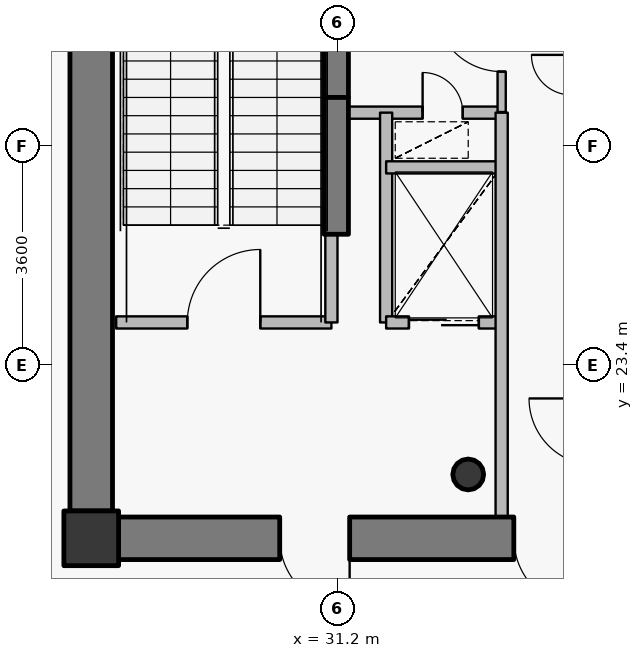
"""IFC4 building model, lengths in metres.
Left out: names, types, materials, properties, quantities, classifications, styles, units other than length and angle.
Written with IfcOpenShell. Run it as: python <this file> out.ifc"""

import sys

from ifc_helpers import new_model, si_unit, direction, frame, frame_2d, origin, origin_2d, place, context, subcontext, project, spatial, rectangle, hollow_circle, extrude, source, transform, mapped, element, fill, save


model = new_model("IFC4")
c1 = context("Model", 3, precision=1e-05, world=origin(), true_north=direction((0.0, 1.0)))
c2 = subcontext(c1, "Body", "Model", "MODEL_VIEW")
j1 = project(units=[si_unit("LENGTHUNIT", "METRE"), si_unit("PLANEANGLEUNIT", "RADIAN")], contexts=[c1])
p1 = place(None, origin())
s1 = spatial("IfcSite", under=j1, at=p1, CompositionType="ELEMENT")
p2 = place(p1, origin())
s2 = spatial("IfcBuilding", under=s1, at=p2, CompositionType="ELEMENT")
p3 = place(p2, frame((0.0, 0.0, 339.2)))
s3 = spatial("IfcBuildingStorey", under=s2, at=p3, CompositionType="ELEMENT", Elevation=339.2)
p4 = place(p3, frame((27.15, 20.55, 0.0), z_axis=(0.0, 0.0, 1.0), x_axis=(1.0, 0.0, 0.0)))
e1 = element("IfcColumn", 1, at=p4, inside=s3, PredefinedType="COLUMN", context=c2, shape_type="SweptSolid", body=[
    extrude(rectangle(XDim=0.9, YDim=0.9, at=origin_2d()), origin(), (0.0, 0.0, 1.0), 3.8),
])
p5 = place(p3, frame((33.35, 21.6, 0.0), z_axis=(0.0, 0.0, 1.0), x_axis=(1.0, 0.0, 0.0)))
e2 = element("IfcColumn", 2, at=p5, inside=s3, PredefinedType="COLUMN", context=c2, shape_type="SweptSolid", body=[
    extrude(hollow_circle(Radius=0.254, WallThickness=0.02, at=origin_2d()), origin(), (0.0, 0.0, 1.0), 3.8),
])
p6 = place(p3, frame((31.18, 27.8, 0.0), z_axis=(0.0, 0.0, 1.0), x_axis=(0.0, 1.0, 0.0)))
e3 = element("IfcWall", 3, at=p6, inside=s3, PredefinedType="SHEAR", context=c2, shape_type="SweptSolid", body=[
    extrude(rectangle(XDim=4.75, YDim=0.4, at=frame_2d((2.375, 0.0))), origin(), (0.0, 0.0, 1.0), 3.8),
])
p7 = place(p3, frame((44.4, 20.55, 0.0), z_axis=(0.0, 0.0, 1.0), x_axis=(-1.0, 0.0, 0.0)))
e4 = element("IfcWall", 4, at=p7, inside=s3, PredefinedType="SHEAR", context=c2, shape_type="SweptSolid", body=[
    extrude(rectangle(XDim=16.8, YDim=0.7, at=frame_2d((8.4, 0.0))), origin(), (0.0, 0.0, 1.0), 3.1),
])
p8 = place(p7, frame((13.0, 0.0, 0.0)))
e5 = element("IfcOpeningElement", 5, at=p8, cuts=e4, PredefinedType="OPENING", context=c2, shape_type="SweptSolid", body=[
    extrude(rectangle(XDim=1.15, YDim=2.15, at=origin_2d()), frame((0.575, 0.36, 1.075), z_axis=(0.0, -1.0, 0.0), x_axis=(1.0, 0.0, 0.0)), (0.0, 0.0, 1.0), 0.72),
])
p9 = place(p7, frame((9.15, 0.0, 0.0)))
e6 = element("IfcOpeningElement", 6, at=p9, cuts=e4, PredefinedType="OPENING", context=c2, shape_type="SweptSolid", body=[
    extrude(rectangle(XDim=1.15, YDim=2.15, at=origin_2d()), frame((0.575, 0.36, 1.075), z_axis=(0.0, -1.0, 0.0), x_axis=(1.0, 0.0, 0.0)), (0.0, 0.0, 1.0), 0.72),
])
p10 = place(p3, frame((27.15, 21.0, 0.0), z_axis=(0.0, 0.0, 1.0), x_axis=(0.0, 1.0, 0.0)))
e7 = element("IfcWall", 7, at=p10, inside=s3, PredefinedType="SHEAR", context=c2, shape_type="SweptSolid", body=[
    extrude(rectangle(XDim=12.0, YDim=0.7, at=frame_2d((6.0, 0.0))), origin(), (0.0, 0.0, 1.0), 3.1),
])
p11 = place(p3, frame((31.18, 25.55, 0.0), z_axis=(0.0, 0.0, 1.0), x_axis=(0.0, 1.0, 0.0)))
e8 = element("IfcWall", 8, at=p11, inside=s3, PredefinedType="SHEAR", context=c2, shape_type="SweptSolid", body=[
    extrude(rectangle(XDim=2.25, YDim=0.4, at=frame_2d((1.125, 0.0))), origin(), (0.0, 0.0, 1.0), 3.15),
])
p12 = place(p3, frame((27.56, 24.1, 0.0), z_axis=(0.0, 0.0, 1.0), x_axis=(1.0, 0.0, 0.0)))
e9 = element("IfcWall", 9, at=p12, inside=s3, PredefinedType="PARTITIONING", context=c2, shape_type="SweptSolid", body=[
    extrude(rectangle(XDim=3.54, YDim=0.2, at=frame_2d((1.77, 0.0))), origin(), (0.0, 0.0, 1.0), 3.55),
])
p13 = place(p12, frame((1.17, 0.0, 0.0)))
e10 = element("IfcOpeningElement", 10, at=p13, cuts=e9, PredefinedType="OPENING", context=c2, shape_type="SweptSolid", body=[
    extrude(rectangle(XDim=1.2, YDim=2.15, at=origin_2d()), frame((0.6, 0.11, 1.075), z_axis=(0.0, -1.0, 0.0), x_axis=(1.0, 0.0, 0.0)), (0.0, 0.0, 1.0), 0.22),
])
p14 = place(p3, frame((31.1, 24.1, 0.0), z_axis=(0.0, 0.0, 1.0), x_axis=(0.0, 1.0, 0.0)))
e11 = element("IfcWall", 11, at=p14, inside=s3, PredefinedType="PARTITIONING", context=c2, shape_type="SweptSolid", body=[
    extrude(rectangle(XDim=1.44, YDim=0.2, at=frame_2d((0.72, 0.0))), origin(), (0.0, 0.0, 1.0), 3.55),
])
p15 = place(p3, frame((31.1, 27.55, 0.0), z_axis=(0.0, 0.0, 1.0), x_axis=(1.0, 0.0, 0.0)))
e12 = element("IfcWall", 12, at=p15, inside=s3, PredefinedType="PARTITIONING", context=c2, shape_type="SweptSolid", body=[
    extrude(rectangle(XDim=2.8, YDim=0.2, at=frame_2d((1.4, 0.0))), origin(), (0.0, 0.0, 1.0), 3.135),
])
p16 = place(p15, frame((1.5, 0.0, 0.0)))
e13 = element("IfcOpeningElement", 13, at=p16, cuts=e12, PredefinedType="OPENING", context=c2, shape_type="SweptSolid", body=[
    extrude(rectangle(XDim=0.66, YDim=2.05, at=origin_2d()), frame((0.33, 0.11, 1.025), z_axis=(0.0, -1.0, 0.0), x_axis=(1.0, 0.0, 0.0)), (0.0, 0.0, 1.0), 0.22),
])
p17 = place(p3, frame((32.0, 24.1, 0.0), z_axis=(0.0, 0.0, 1.0), x_axis=(0.0, 1.0, 0.0)))
e14 = element("IfcWall", 14, at=p17, inside=s3, PredefinedType="PARTITIONING", context=c2, shape_type="SweptSolid", body=[
    extrude(rectangle(XDim=3.45, YDim=0.2, at=frame_2d((1.725, 0.0))), origin(), (0.0, 0.0, 1.0), 3.55),
])
p18 = place(p3, frame((32.0, 24.1, 0.0), z_axis=(0.0, 0.0, 1.0), x_axis=(1.0, 0.0, 0.0)))
e15 = element("IfcWall", 15, at=p18, inside=s3, PredefinedType="PARTITIONING", context=c2, shape_type="SweptSolid", body=[
    extrude(rectangle(XDim=1.9, YDim=0.2, at=frame_2d((0.95, 0.0))), origin(), (0.0, 0.0, 1.0), 3.135),
])
p19 = place(p18, frame((0.375, 0.0, 0.0)))
e16 = element("IfcOpeningElement", 16, at=p19, cuts=e15, PredefinedType="OPENING", context=c2, shape_type="SweptSolid", body=[
    extrude(rectangle(XDim=1.15, YDim=2.15, at=origin_2d()), frame((0.575, 0.11, 1.075), z_axis=(0.0, -1.0, 0.0), x_axis=(1.0, 0.0, 0.0)), (0.0, 0.0, 1.0), 0.22),
])
p20 = place(p3, frame((32.0, 26.65, 0.0), z_axis=(0.0, 0.0, 1.0), x_axis=(1.0, 0.0, 0.0)))
e17 = element("IfcWall", 17, at=p20, inside=s3, PredefinedType="PARTITIONING", context=c2, shape_type="SweptSolid", body=[
    extrude(rectangle(XDim=1.9, YDim=0.2, at=frame_2d((0.95, 0.0))), origin(), (0.0, 0.0, 1.0), 3.135),
])
p21 = place(p3, frame((33.9, 20.9, 0.0), z_axis=(0.0, 0.0, 1.0), x_axis=(0.0, 1.0, 0.0)))
e18 = element("IfcWall", 18, at=p21, inside=s3, PredefinedType="PARTITIONING", context=c2, shape_type="SweptSolid", body=[
    extrude(rectangle(XDim=6.65, YDim=0.2, at=frame_2d((3.325, 0.0))), origin(), (0.0, 0.0, 1.0), 3.135),
])
p22 = place(p3, frame((33.9, 27.56, 0.0), z_axis=(0.0, 0.0, 1.0), x_axis=(0.0, 1.0, 0.0)))
e19 = element("IfcWall", 19, at=p22, inside=s3, PredefinedType="PARTITIONING", context=c2, shape_type="SweptSolid", body=[
    extrude(rectangle(XDim=5.54, YDim=0.135, at=frame_2d((2.77, 0.0))), origin(), (0.0, 0.0, 1.0), 3.135),
])
p23 = place(p22, frame((0.665, 0.0, 0.0)))
e20 = element("IfcOpeningElement", 20, at=p23, cuts=e19, PredefinedType="OPENING", context=c2, shape_type="SweptSolid", body=[
    extrude(rectangle(XDim=1.1, YDim=2.15, at=origin_2d()), frame((0.55, 0.078, 1.075), z_axis=(0.0, -1.0, 0.0), x_axis=(1.0, 0.0, 0.0)), (0.0, 0.0, 1.0), 0.155),
])
p24 = place(p22, frame((3.117, 0.0, 0.0)))
e21 = element("IfcOpeningElement", 21, at=p24, cuts=e19, PredefinedType="OPENING", context=c2, shape_type="SweptSolid", body=[
    extrude(rectangle(XDim=1.1, YDim=2.15, at=origin_2d()), frame((0.55, 0.078, 1.075), z_axis=(0.0, -1.0, 0.0), x_axis=(1.0, 0.0, 0.0)), (0.0, 0.0, 1.0), 0.155),
])
p25 = place(p3, frame((26.8, 20.99, 0.0), z_axis=(0.0, 0.0, 1.0), x_axis=(0.0, -1.0, 0.0)))
e22 = element("IfcWall", 22, at=p25, inside=s3, PredefinedType="PARTITIONING", context=c2, shape_type="SweptSolid", body=[
    extrude(rectangle(XDim=0.79, YDim=0.135, at=frame_2d((0.395, 0.0))), origin(), (0.0, 0.0, 1.0), 3.085),
])
p26 = place(p3, frame((27.107, 20.2, 0.0), z_axis=(0.0, 0.0, 1.0), x_axis=(1.0, 0.0, 0.0)))
e23 = element("IfcWall", 23, at=p26, inside=s3, PredefinedType="PARTITIONING", context=c2, shape_type="SweptSolid", body=[
    extrude(rectangle(XDim=0.483, YDim=0.135, at=frame_2d((0.241, 0.0))), origin(), (0.0, 0.0, 1.0), 3.085),
])
m1 = source(origin(), c2, "Body", "SweptSolid", [
    extrude(rectangle(XDim=1.15, YDim=2.15, at=origin_2d()), frame((0.575, 0.025, 1.075), z_axis=(0.0, -1.0, 0.0), x_axis=(1.0, 0.0, 0.0)), (0.0, 0.0, 1.0), 0.05),
])
p27 = place(p8, origin())
e24 = element("IfcDoor", 24, at=p27, inside=s3, OperationType="SINGLE_SWING_LEFT", PredefinedType="DOOR", context=c2, shape_type="MappedRepresentation", body=[
    mapped(m1, transform((0.0, 0.0, 0.0), x_axis=(1.0, 0.0, 0.0), y_axis=(0.0, 1.0, 0.0), z_axis=(0.0, 0.0, 1.0), scale=1.0)),
])
fill(e5, e24)
p28 = place(p9, origin())
e25 = element("IfcDoor", 25, at=p28, inside=s3, OperationType="SINGLE_SWING_LEFT", PredefinedType="DOOR", context=c2, shape_type="MappedRepresentation", body=[
    mapped(m1, transform((0.0, 0.0, 0.0), x_axis=(1.0, 0.0, 0.0), y_axis=(0.0, 1.0, 0.0), z_axis=(0.0, 0.0, 1.0), scale=1.0)),
])
fill(e6, e25)
m2 = source(origin(), c2, "Body", "SweptSolid", [
    extrude(rectangle(XDim=1.2, YDim=2.15, at=origin_2d()), frame((0.6, 0.025, 1.075), z_axis=(0.0, -1.0, 0.0), x_axis=(1.0, 0.0, 0.0)), (0.0, 0.0, 1.0), 0.05),
])
p29 = place(p13, origin())
e26 = element("IfcDoor", 26, at=p29, inside=s3, OperationType="SINGLE_SWING_RIGHT", PredefinedType="DOOR", context=c2, shape_type="MappedRepresentation", body=[
    mapped(m2, transform((0.0, 0.0, 0.0), x_axis=(1.0, 0.0, 0.0), y_axis=(0.0, 1.0, 0.0), z_axis=(0.0, 0.0, 1.0), scale=1.0)),
])
fill(e10, e26)
m3 = source(origin(), c2, "Body", "SweptSolid", [
    extrude(rectangle(XDim=1.15, YDim=2.15, at=origin_2d()), frame((0.575, 0.025, 1.075), z_axis=(0.0, -1.0, 0.0), x_axis=(1.0, 0.0, 0.0)), (0.0, 0.0, 1.0), 0.05),
])
p30 = place(p19, origin())
e27 = element("IfcDoor", 27, at=p30, inside=s3, OperationType="DOUBLE_DOOR_SLIDING", PredefinedType="USERDEFINED", context=c2, shape_type="MappedRepresentation", body=[
    mapped(m3, transform((0.0, 0.0, 0.0), x_axis=(1.0, 0.0, 0.0), y_axis=(0.0, 1.0, 0.0), z_axis=(0.0, 0.0, 1.0), scale=1.0)),
])
fill(e16, e27)
m4 = source(origin(), c2, "Body", "SweptSolid", [
    extrude(rectangle(XDim=1.1, YDim=2.15, at=origin_2d()), frame((0.55, 0.025, 1.075), z_axis=(0.0, -1.0, 0.0), x_axis=(1.0, 0.0, 0.0)), (0.0, 0.0, 1.0), 0.05),
])
p31 = place(p23, origin())
e28 = element("IfcDoor", 28, at=p31, inside=s3, OperationType="SINGLE_SWING_RIGHT", PredefinedType="DOOR", context=c2, shape_type="MappedRepresentation", body=[
    mapped(m4, transform((0.0, 0.0, 0.0), x_axis=(1.0, 0.0, 0.0), y_axis=(0.0, 1.0, 0.0), z_axis=(0.0, 0.0, 1.0), scale=1.0)),
])
fill(e20, e28)
m5 = source(origin(), c2, "Body", "SweptSolid", [
    extrude(rectangle(XDim=0.66, YDim=2.05, at=origin_2d()), frame((0.33, 0.025, 1.025), z_axis=(0.0, -1.0, 0.0), x_axis=(1.0, 0.0, 0.0)), (0.0, 0.0, 1.0), 0.05),
])
p32 = place(p16, origin())
e29 = element("IfcDoor", 29, at=p32, inside=s3, OperationType="SINGLE_SWING_LEFT", PredefinedType="USERDEFINED", context=c2, shape_type="MappedRepresentation", body=[
    mapped(m5, transform((0.0, 0.0, 0.0), x_axis=(1.0, 0.0, 0.0), y_axis=(0.0, 1.0, 0.0), z_axis=(0.0, 0.0, 1.0), scale=1.0)),
])
fill(e13, e29)
save(model, sys.argv[1])
